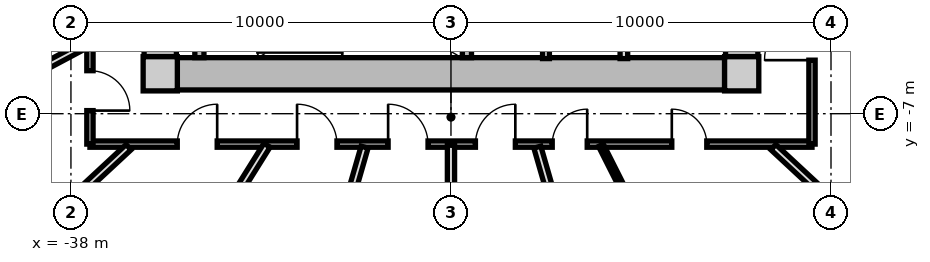
"""IFC4 building model, lengths in metres.
Left out: names, types, materials, properties, quantities, classifications, styles, units other than length and angle.
Written with IfcOpenShell. Run it as: python <this file> out.ifc"""

import sys

from ifc_helpers import new_model, si_unit, direction, frame, frame_2d, origin, origin_2d, place, context, subcontext, project, spatial, rectangle, extrude, source, transform, mapped, element, fill, save


model = new_model("IFC4")
c1 = context("Model", 3, precision=1e-05, world=origin(), true_north=direction((0.0, 1.0)))
c2 = subcontext(c1, "Body", "Model", "MODEL_VIEW")
j1 = project(units=[si_unit("LENGTHUNIT", "METRE"), si_unit("PLANEANGLEUNIT", "RADIAN")], contexts=[c1])
p1 = place(None, origin())
s1 = spatial("IfcSite", under=j1, at=p1, CompositionType="ELEMENT")
p2 = place(p1, origin())
s2 = spatial("IfcBuilding", under=s1, at=p2, CompositionType="ELEMENT")
p3 = place(p2, frame((0.0, 0.0, 39.9)))
s3 = spatial("IfcBuildingStorey", under=s2, at=p3, CompositionType="ELEMENT", Elevation=39.9)
m1 = source(origin(), c2, "Body", "SweptSolid", [
    extrude(rectangle(XDim=0.9, YDim=0.9, at=origin_2d()), origin(), (0.0, 0.0, 1.0), 3.05),
])
for number, where, z_axis, x_axis in (
    (1, (-35.65, -5.95, 0.0), (0.0, 0.0, 1.0), (1.0, 0.0, 0.0)),
    (2, (-20.35, -5.95, 0.0), (0.0, 0.0, 1.0), (1.0, 0.0, 0.0)),
):
    element("IfcColumn", number, at=place(p3, frame(where, z_axis=z_axis, x_axis=x_axis)), inside=s3, PredefinedType="COLUMN", context=c2, shape_type="MappedRepresentation", body=[
        mapped(m1, transform((0.0, 0.0, 0.0), x_axis=(1.0, 0.0, 0.0), y_axis=(0.0, 1.0, 0.0), z_axis=(0.0, 0.0, 1.0), scale=1.0)),
    ])
m2 = source(origin(), c2, "Body", "SweptSolid", [
    extrude(rectangle(XDim=14.4, YDim=0.85, at=frame_2d((7.2, 0.0))), origin(), (0.0, 0.0, 1.0), 2.79),
])
p4 = place(p3, frame((-20.8, -5.95, 0.0), z_axis=(0.0, 0.0, 1.0), x_axis=(-1.0, 0.0, 0.0)))
e3 = element("IfcWall", 3, at=p4, inside=s3, PredefinedType="SHEAR", context=c2, shape_type="MappedRepresentation", body=[
    mapped(m2, transform((0.0, 0.0, 0.0), x_axis=(1.0, 0.0, 0.0), y_axis=(0.0, 1.0, 0.0), z_axis=(0.0, 0.0, 1.0), scale=1.0)),
])
m3 = source(origin(), c2, "Body", "SweptSolid", [
    extrude(rectangle(XDim=11.0, YDim=0.85, at=frame_2d((5.5, 0.0))), origin(), (0.0, 0.0, 1.0), 2.79),
])
p5 = place(p3, frame((-35.65, -5.5, 0.0), z_axis=(0.0, 0.0, 1.0), x_axis=(0.0, 1.0, 0.0)))
e4 = element("IfcWall", 4, at=p5, inside=s3, PredefinedType="SHEAR", context=c2, shape_type="MappedRepresentation", body=[
    mapped(m3, transform((0.0, 0.0, 0.0), x_axis=(1.0, 0.0, 0.0), y_axis=(0.0, 1.0, 0.0), z_axis=(0.0, 0.0, 1.0), scale=1.0)),
])
p6 = place(p5, frame((3.8, 0.0, 0.0)))
e5 = element("IfcOpeningElement", 5, at=p6, cuts=e4, PredefinedType="OPENING", context=c2, shape_type="SweptSolid", body=[
    extrude(rectangle(XDim=1.2, YDim=2.15, at=frame_2d((0.6, 1.075))), frame((0.0, 0.435, 0.0), z_axis=(0.0, -1.0, 0.0), x_axis=(1.0, 0.0, 0.0)), (0.0, 0.0, 1.0), 0.87),
])
p7 = place(p3, frame((-20.35, 5.5, 0.0), z_axis=(0.0, 0.0, 1.0), x_axis=(0.0, -1.0, 0.0)))
e6 = element("IfcWall", 6, at=p7, inside=s3, PredefinedType="SHEAR", context=c2, shape_type="MappedRepresentation", body=[
    mapped(m3, transform((0.0, 0.0, 0.0), x_axis=(1.0, 0.0, 0.0), y_axis=(0.0, 1.0, 0.0), z_axis=(0.0, 0.0, 1.0), scale=1.0)),
])
p8 = place(p7, frame((5.65, 0.0, 0.0)))
e7 = element("IfcOpeningElement", 7, at=p8, cuts=e6, PredefinedType="OPENING", context=c2, shape_type="SweptSolid", body=[
    extrude(rectangle(XDim=1.2, YDim=2.15, at=frame_2d((0.6, 1.075))), frame((0.0, 0.435, 0.0), z_axis=(0.0, -1.0, 0.0), x_axis=(1.0, 0.0, 0.0)), (0.0, 0.0, 1.0), 0.87),
])
p9 = place(p7, frame((9.3, 0.0, 0.0)))
e8 = element("IfcOpeningElement", 8, at=p9, cuts=e6, PredefinedType="OPENING", context=c2, shape_type="SweptSolid", body=[
    extrude(rectangle(XDim=1.0, YDim=2.1, at=frame_2d((0.5, 1.05))), frame((0.0, 0.435, 0.0), z_axis=(0.0, -1.0, 0.0), x_axis=(1.0, 0.0, 0.0)), (0.0, 0.0, 1.0), 0.87),
])
m4 = source(origin(), c2, "Body", "SweptSolid", [
    extrude(rectangle(XDim=3.075, YDim=0.24, at=frame_2d((1.538, 0.0))), origin(), (0.0, 0.0, 1.0), 2.79),
])
for number, where, z_axis, x_axis in (
    (9, (-34.62, -5.525, 0.0), (0.0, 0.0, 1.0), (0.0, 1.0, 0.0)),
    (10, (-27.58, -5.525, 0.0), (0.0, 0.0, 1.0), (0.0, 1.0, 0.0)),
):
    element("IfcWall", number, at=place(p3, frame(where, z_axis=z_axis, x_axis=x_axis)), inside=s3, PredefinedType="PARTITIONING", context=c2, shape_type="MappedRepresentation", body=[
        mapped(m4, transform((0.0, 0.0, 0.0), x_axis=(1.0, 0.0, 0.0), y_axis=(0.0, 1.0, 0.0), z_axis=(0.0, 0.0, 1.0), scale=1.0)),
    ])
m5 = source(origin(), c2, "Body", "SweptSolid", [
    extrude(rectangle(XDim=3.8, YDim=0.2, at=frame_2d((1.9, 0.0))), origin(), (0.0, 0.0, 1.0), 2.775),
])
p10 = place(p3, frame((-23.45, -5.55, 0.0), z_axis=(0.0, 0.0, 1.0), x_axis=(0.0, 1.0, 0.0)))
e11 = element("IfcWall", 11, at=p10, inside=s3, PredefinedType="PARTITIONING", context=c2, shape_type="MappedRepresentation", body=[
    mapped(m5, transform((0.0, 0.0, 0.0), x_axis=(1.0, 0.0, 0.0), y_axis=(0.0, 1.0, 0.0), z_axis=(0.0, 0.0, 1.0), scale=1.0)),
])
m6 = source(origin(), c2, "Body", "SweptSolid", [
    extrude(rectangle(XDim=3.22, YDim=0.18, at=frame_2d((1.61, 0.0))), origin(), (0.0, 0.0, 1.0), 2.775),
])
p11 = place(p3, frame((-25.5, -5.55, 0.0), z_axis=(0.0, 0.0, 1.0), x_axis=(0.0, 1.0, 0.0)))
e12 = element("IfcWall", 12, at=p11, inside=s3, PredefinedType="PARTITIONING", context=c2, shape_type="MappedRepresentation", body=[
    mapped(m6, transform((0.0, 0.0, 0.0), x_axis=(1.0, 0.0, 0.0), y_axis=(0.0, 1.0, 0.0), z_axis=(0.0, 0.0, 1.0), scale=1.0)),
])
m7 = source(origin(), c2, "Body", "SweptSolid", [
    extrude(rectangle(XDim=19.0, YDim=0.165, at=frame_2d((9.5, 0.0))), origin(), (0.0, 0.0, 1.0), 2.775),
])
p12 = place(p3, frame((-18.5, -7.8, 0.0), z_axis=(0.0, 0.0, 1.0), x_axis=(-1.0, 0.0, 0.0)))
e13 = element("IfcWall", 13, at=p12, inside=s3, PredefinedType="PARTITIONING", context=c2, shape_type="MappedRepresentation", body=[
    mapped(m7, transform((0.0, 0.0, 0.0), x_axis=(1.0, 0.0, 0.0), y_axis=(0.0, 1.0, 0.0), z_axis=(0.0, 0.0, 1.0), scale=1.0)),
])
p13 = place(p12, frame((15.652, 0.0, 0.0)))
e14 = element("IfcOpeningElement", 14, at=p13, cuts=e13, PredefinedType="OPENING", context=c2, shape_type="SweptSolid", body=[
    extrude(rectangle(XDim=1.05, YDim=2.15, at=frame_2d((0.525, 1.075))), frame((0.0, 0.093, 0.0), z_axis=(0.0, -1.0, 0.0), x_axis=(1.0, 0.0, 0.0)), (0.0, 0.0, 1.0), 0.185),
])
p14 = place(p12, frame((12.5, 0.0, 0.0)))
e15 = element("IfcOpeningElement", 15, at=p14, cuts=e13, PredefinedType="OPENING", context=c2, shape_type="SweptSolid", body=[
    extrude(rectangle(XDim=1.05, YDim=2.15, at=frame_2d((0.525, 1.075))), frame((0.0, 0.093, 0.0), z_axis=(0.0, -1.0, 0.0), x_axis=(1.0, 0.0, 0.0)), (0.0, 0.0, 1.0), 0.185),
])
p15 = place(p12, frame((10.104, 0.0, 0.0)))
e16 = element("IfcOpeningElement", 16, at=p15, cuts=e13, PredefinedType="OPENING", context=c2, shape_type="SweptSolid", body=[
    extrude(rectangle(XDim=1.05, YDim=2.15, at=frame_2d((0.525, 1.075))), frame((0.0, 0.093, 0.0), z_axis=(0.0, -1.0, 0.0), x_axis=(1.0, 0.0, 0.0)), (0.0, 0.0, 1.0), 0.185),
])
p16 = place(p12, frame((7.806, 0.0, 0.0)))
e17 = element("IfcOpeningElement", 17, at=p16, cuts=e13, PredefinedType="OPENING", context=c2, shape_type="SweptSolid", body=[
    extrude(rectangle(XDim=1.05, YDim=2.15, at=frame_2d((0.525, 1.075))), frame((0.0, 0.093, 0.0), z_axis=(0.0, -1.0, 0.0), x_axis=(1.0, 0.0, 0.0)), (0.0, 0.0, 1.0), 0.185),
])
p17 = place(p12, frame((5.915, 0.0, 0.0)))
e18 = element("IfcOpeningElement", 18, at=p17, cuts=e13, PredefinedType="OPENING", context=c2, shape_type="SweptSolid", body=[
    extrude(rectangle(XDim=0.92, YDim=2.1, at=frame_2d((0.46, 1.05))), frame((0.0, 0.093, 0.0), z_axis=(0.0, -1.0, 0.0), x_axis=(1.0, 0.0, 0.0)), (0.0, 0.0, 1.0), 0.185),
])
p18 = place(p12, frame((2.769, 0.0, 0.0)))
e19 = element("IfcOpeningElement", 19, at=p18, cuts=e13, PredefinedType="OPENING", context=c2, shape_type="SweptSolid", body=[
    extrude(rectangle(XDim=0.92, YDim=2.1, at=frame_2d((0.46, 1.05))), frame((0.0, 0.093, 0.0), z_axis=(0.0, -1.0, 0.0), x_axis=(1.0, 0.0, 0.0)), (0.0, 0.0, 1.0), 0.185),
])
m8 = source(origin(), c2, "Body", "SweptSolid", [
    extrude(rectangle(XDim=15.6, YDim=0.165, at=frame_2d((7.8, 0.0))), origin(), (0.0, 0.0, 1.0), 2.775),
])
p19 = place(p3, frame((-37.5, -7.8, 0.0), z_axis=(0.0, 0.0, 1.0), x_axis=(0.0, 1.0, 0.0)))
e20 = element("IfcWall", 20, at=p19, inside=s3, PredefinedType="PARTITIONING", context=c2, shape_type="MappedRepresentation", body=[
    mapped(m8, transform((0.0, 0.0, 0.0), x_axis=(1.0, 0.0, 0.0), y_axis=(0.0, 1.0, 0.0), z_axis=(0.0, 0.0, 1.0), scale=1.0)),
])
p20 = place(p19, frame((13.293, 0.0, 0.0)))
e21 = element("IfcOpeningElement", 21, at=p20, cuts=e20, PredefinedType="OPENING", context=c2, shape_type="SweptSolid", body=[
    extrude(rectangle(XDim=1.05, YDim=2.15, at=frame_2d((0.525, 1.075))), frame((0.0, 0.093, 0.0), z_axis=(0.0, -1.0, 0.0), x_axis=(1.0, 0.0, 0.0)), (0.0, 0.0, 1.0), 0.185),
])
p21 = place(p19, frame((11.018, 0.0, 0.0)))
e22 = element("IfcOpeningElement", 22, at=p21, cuts=e20, PredefinedType="OPENING", context=c2, shape_type="SweptSolid", body=[
    extrude(rectangle(XDim=1.05, YDim=2.15, at=frame_2d((0.525, 1.075))), frame((0.0, 0.093, 0.0), z_axis=(0.0, -1.0, 0.0), x_axis=(1.0, 0.0, 0.0)), (0.0, 0.0, 1.0), 0.185),
])
p22 = place(p19, frame((7.812, 0.0, 0.0)))
e23 = element("IfcOpeningElement", 23, at=p22, cuts=e20, PredefinedType="OPENING", context=c2, shape_type="SweptSolid", body=[
    extrude(rectangle(XDim=1.05, YDim=2.15, at=frame_2d((0.525, 1.075))), frame((0.0, 0.093, 0.0), z_axis=(0.0, -1.0, 0.0), x_axis=(1.0, 0.0, 0.0)), (0.0, 0.0, 1.0), 0.185),
])
p23 = place(p19, frame((6.035, 0.0, 0.0)))
e24 = element("IfcOpeningElement", 24, at=p23, cuts=e20, PredefinedType="OPENING", context=c2, shape_type="SweptSolid", body=[
    extrude(rectangle(XDim=1.05, YDim=2.15, at=frame_2d((0.525, 1.075))), frame((0.0, 0.093, 0.0), z_axis=(0.0, -1.0, 0.0), x_axis=(1.0, 0.0, 0.0)), (0.0, 0.0, 1.0), 0.185),
])
p24 = place(p19, frame((3.489, 0.0, 0.0)))
e25 = element("IfcOpeningElement", 25, at=p24, cuts=e20, PredefinedType="OPENING", context=c2, shape_type="SweptSolid", body=[
    extrude(rectangle(XDim=1.05, YDim=2.15, at=frame_2d((0.525, 1.075))), frame((0.0, 0.093, 0.0), z_axis=(0.0, -1.0, 0.0), x_axis=(1.0, 0.0, 0.0)), (0.0, 0.0, 1.0), 0.185),
])
p25 = place(p19, frame((0.882, 0.0, 0.0)))
e26 = element("IfcOpeningElement", 26, at=p25, cuts=e20, PredefinedType="OPENING", context=c2, shape_type="SweptSolid", body=[
    extrude(rectangle(XDim=1.05, YDim=2.15, at=frame_2d((0.525, 1.075))), frame((0.0, 0.093, 0.0), z_axis=(0.0, -1.0, 0.0), x_axis=(1.0, 0.0, 0.0)), (0.0, 0.0, 1.0), 0.185),
])
p26 = place(p3, frame((-18.5, 7.8, 0.0), z_axis=(0.0, 0.0, 1.0), x_axis=(0.0, -1.0, 0.0)))
e27 = element("IfcWall", 27, at=p26, inside=s3, PredefinedType="PARTITIONING", context=c2, shape_type="MappedRepresentation", body=[
    mapped(m8, transform((0.0, 0.0, 0.0), x_axis=(1.0, 0.0, 0.0), y_axis=(0.0, 1.0, 0.0), z_axis=(0.0, 0.0, 1.0), scale=1.0)),
])
p27 = place(p26, frame((12.141, 0.0, 0.0)))
e28 = element("IfcOpeningElement", 28, at=p27, cuts=e27, PredefinedType="OPENING", context=c2, shape_type="SweptSolid", body=[
    extrude(rectangle(XDim=1.25, YDim=2.2, at=frame_2d((0.625, 1.1))), frame((0.0, 0.093, 0.0), z_axis=(0.0, -1.0, 0.0), x_axis=(1.0, 0.0, 0.0)), (0.0, 0.0, 1.0), 0.185),
])
p28 = place(p26, frame((7.175, 0.0, 0.0)))
e29 = element("IfcOpeningElement", 29, at=p28, cuts=e27, PredefinedType="OPENING", context=c2, shape_type="SweptSolid", body=[
    extrude(rectangle(XDim=1.25, YDim=2.2, at=frame_2d((0.625, 1.1))), frame((0.0, 0.093, 0.0), z_axis=(0.0, -1.0, 0.0), x_axis=(1.0, 0.0, 0.0)), (0.0, 0.0, 1.0), 0.185),
])
p29 = place(p26, frame((2.826, 0.0, 0.0)))
e30 = element("IfcOpeningElement", 30, at=p29, cuts=e27, PredefinedType="OPENING", context=c2, shape_type="SweptSolid", body=[
    extrude(rectangle(XDim=1.05, YDim=2.15, at=frame_2d((0.525, 1.075))), frame((0.0, 0.093, 0.0), z_axis=(0.0, -1.0, 0.0), x_axis=(1.0, 0.0, 0.0)), (0.0, 0.0, 1.0), 0.185),
])
p30 = place(p26, frame((0.881, 0.0, 0.0)))
e31 = element("IfcOpeningElement", 31, at=p30, cuts=e27, PredefinedType="OPENING", context=c2, shape_type="SweptSolid", body=[
    extrude(rectangle(XDim=1.05, YDim=2.15, at=frame_2d((0.525, 1.075))), frame((0.0, 0.093, 0.0), z_axis=(0.0, -1.0, 0.0), x_axis=(1.0, 0.0, 0.0)), (0.0, 0.0, 1.0), 0.185),
])
m9 = source(origin(), c2, "Body", "SweptSolid", [
    extrude(rectangle(XDim=7.435, YDim=0.19, at=frame_2d((3.717, 0.0))), origin(), (0.0, 0.0, 1.0), 2.225),
])
p31 = place(p3, frame((-36.483, -7.88, 0.0), z_axis=(0.0, 0.0, 1.0), x_axis=(-0.732651956848, -0.680603489652, 0.0)))
e32 = element("IfcWall", 32, at=p31, inside=s3, PredefinedType="PARTITIONING", context=c2, shape_type="MappedRepresentation", body=[
    mapped(m9, transform((0.0, 0.0, 0.0), x_axis=(1.0, 0.0, 0.0), y_axis=(0.0, 1.0, 0.0), z_axis=(0.0, 0.0, 1.0), scale=1.0)),
])
m10 = source(origin(), c2, "Body", "SweptSolid", [
    extrude(rectangle(XDim=7.873, YDim=0.19, at=frame_2d((3.937, 0.0))), origin(), (0.0, 0.0, 1.0), 2.775),
])
p32 = place(p3, frame((-37.53, -5.138, 0.0), z_axis=(0.0, 0.0, 1.0), x_axis=(-0.882666052726, -0.470000680175, 0.0)))
e33 = element("IfcWall", 33, at=p32, inside=s3, PredefinedType="PARTITIONING", context=c2, shape_type="MappedRepresentation", body=[
    mapped(m10, transform((0.0, 0.0, 0.0), x_axis=(1.0, 0.0, 0.0), y_axis=(0.0, 1.0, 0.0), z_axis=(0.0, 0.0, 1.0), scale=1.0)),
])
m11 = source(origin(), c2, "Body", "SweptSolid", [
    extrude(rectangle(XDim=10.196, YDim=0.19, at=frame_2d((5.098, 0.0))), origin(), (0.0, 0.0, 1.0), 2.225),
])
p33 = place(p3, frame((-30.273, -7.88, 0.0), z_axis=(0.0, 0.0, 1.0), x_axis=(-0.277136420347, -0.960830580549, 0.0)))
e34 = element("IfcWall", 34, at=p33, inside=s3, PredefinedType="PARTITIONING", context=c2, shape_type="MappedRepresentation", body=[
    mapped(m11, transform((0.0, 0.0, 0.0), x_axis=(1.0, 0.0, 0.0), y_axis=(0.0, 1.0, 0.0), z_axis=(0.0, 0.0, 1.0), scale=1.0)),
])
m12 = source(origin(), c2, "Body", "SweptSolid", [
    extrude(rectangle(XDim=8.818, YDim=0.19, at=frame_2d((4.409, 0.0))), origin(), (0.0, 0.0, 1.0), 2.775),
])
p34 = place(p3, frame((-32.841, -7.83, 0.0), z_axis=(0.0, 0.0, 1.0), x_axis=(-0.529931746109, -0.848040296487, 0.0)))
e35 = element("IfcWall", 35, at=p34, inside=s3, PredefinedType="PARTITIONING", context=c2, shape_type="MappedRepresentation", body=[
    mapped(m12, transform((0.0, 0.0, 0.0), x_axis=(1.0, 0.0, 0.0), y_axis=(0.0, 1.0, 0.0), z_axis=(0.0, 0.0, 1.0), scale=1.0)),
])
p35 = place(p3, frame((-25.727, -7.88, 0.0), z_axis=(0.0, 0.0, 1.0), x_axis=(0.277136420347, -0.960830580549, 0.0)))
e36 = element("IfcWall", 36, at=p35, inside=s3, PredefinedType="PARTITIONING", context=c2, shape_type="MappedRepresentation", body=[
    mapped(m11, transform((0.0, 0.0, 0.0), x_axis=(1.0, 0.0, 0.0), y_axis=(0.0, 1.0, 0.0), z_axis=(0.0, 0.0, 1.0), scale=1.0)),
])
m13 = source(origin(), c2, "Body", "SweptSolid", [
    extrude(rectangle(XDim=9.846, YDim=0.19, at=frame_2d((4.923, 0.0))), origin(), (0.0, 0.0, 1.0), 2.775),
])
p36 = place(p3, frame((-28.0, -7.83, 0.0), z_axis=(0.0, 0.0, 1.0), x_axis=(0.0, -1.0, 0.0)))
e37 = element("IfcWall", 37, at=p36, inside=s3, PredefinedType="PARTITIONING", context=c2, shape_type="MappedRepresentation", body=[
    mapped(m13, transform((0.0, 0.0, 0.0), x_axis=(1.0, 0.0, 0.0), y_axis=(0.0, 1.0, 0.0), z_axis=(0.0, 0.0, 1.0), scale=1.0)),
])
p37 = place(p3, frame((-19.517, -7.88, 0.0), z_axis=(0.0, 0.0, 1.0), x_axis=(0.732651956848, -0.680603489652, 0.0)))
e38 = element("IfcWall", 38, at=p37, inside=s3, PredefinedType="PARTITIONING", context=c2, shape_type="MappedRepresentation", body=[
    mapped(m9, transform((0.0, 0.0, 0.0), x_axis=(1.0, 0.0, 0.0), y_axis=(0.0, 1.0, 0.0), z_axis=(0.0, 0.0, 1.0), scale=1.0)),
])
m14 = source(origin(), c2, "Body", "SweptSolid", [
    extrude(rectangle(XDim=9.225, YDim=0.14, at=frame_2d((4.613, 0.0))), origin(), (0.0, 0.0, 1.0), 2.775),
])
p38 = place(p3, frame((-24.054, -7.83, 0.0), z_axis=(0.0, 0.0, 1.0), x_axis=(0.450460543767, -0.892796336523, 0.0)))
e39 = element("IfcWall", 39, at=p38, inside=s3, PredefinedType="PARTITIONING", context=c2, shape_type="MappedRepresentation", body=[
    mapped(m14, transform((0.0, 0.0, 0.0), x_axis=(1.0, 0.0, 0.0), y_axis=(0.0, 1.0, 0.0), z_axis=(0.0, 0.0, 1.0), scale=1.0)),
])
m15 = source(origin(), c2, "Body", "SweptSolid", [
    extrude(rectangle(XDim=1.05, YDim=2.15, at=frame_2d((0.525, 1.075))), frame((0.0, 0.025, 0.0), z_axis=(0.0, -1.0, 0.0), x_axis=(1.0, 0.0, 0.0)), (0.0, 0.0, 1.0), 0.05),
])
p39 = place(p25, frame((1.05, 0.0, 0.0), z_axis=(0.0, 0.0, 1.0), x_axis=(-1.0, 0.0, 0.0)))
e40 = element("IfcDoor", 40, at=p39, inside=s3, OperationType="SINGLE_SWING_RIGHT", PredefinedType="DOOR", context=c2, shape_type="MappedRepresentation", body=[
    mapped(m15, transform((0.0, 0.0, 0.0), x_axis=(1.0, 0.0, 0.0), y_axis=(0.0, 1.0, 0.0), z_axis=(0.0, 0.0, 1.0), scale=1.0)),
])
fill(e26, e40)
p40 = place(p13, frame((1.05, 0.0, 0.0), z_axis=(0.0, 0.0, 1.0), x_axis=(-1.0, 0.0, 0.0)))
e41 = element("IfcDoor", 41, at=p40, inside=s3, OperationType="SINGLE_SWING_RIGHT", PredefinedType="DOOR", context=c2, shape_type="MappedRepresentation", body=[
    mapped(m15, transform((0.0, 0.0, 0.0), x_axis=(1.0, 0.0, 0.0), y_axis=(0.0, 1.0, 0.0), z_axis=(0.0, 0.0, 1.0), scale=1.0)),
])
fill(e14, e41)
p41 = place(p14, frame((1.05, 0.0, 0.0), z_axis=(0.0, 0.0, 1.0), x_axis=(-1.0, 0.0, 0.0)))
e42 = element("IfcDoor", 42, at=p41, inside=s3, OperationType="SINGLE_SWING_LEFT", PredefinedType="DOOR", context=c2, shape_type="MappedRepresentation", body=[
    mapped(m15, transform((0.0, 0.0, 0.0), x_axis=(1.0, 0.0, 0.0), y_axis=(0.0, 1.0, 0.0), z_axis=(0.0, 0.0, 1.0), scale=1.0)),
])
fill(e15, e42)
p42 = place(p15, frame((1.05, 0.0, 0.0), z_axis=(0.0, 0.0, 1.0), x_axis=(-1.0, 0.0, 0.0)))
e43 = element("IfcDoor", 43, at=p42, inside=s3, OperationType="SINGLE_SWING_LEFT", PredefinedType="DOOR", context=c2, shape_type="MappedRepresentation", body=[
    mapped(m15, transform((0.0, 0.0, 0.0), x_axis=(1.0, 0.0, 0.0), y_axis=(0.0, 1.0, 0.0), z_axis=(0.0, 0.0, 1.0), scale=1.0)),
])
fill(e16, e43)
p43 = place(p16, frame((1.05, 0.0, 0.0), z_axis=(0.0, 0.0, 1.0), x_axis=(-1.0, 0.0, 0.0)))
e44 = element("IfcDoor", 44, at=p43, inside=s3, OperationType="SINGLE_SWING_RIGHT", PredefinedType="DOOR", context=c2, shape_type="MappedRepresentation", body=[
    mapped(m15, transform((0.0, 0.0, 0.0), x_axis=(1.0, 0.0, 0.0), y_axis=(0.0, 1.0, 0.0), z_axis=(0.0, 0.0, 1.0), scale=1.0)),
])
fill(e17, e44)
m16 = source(origin(), c2, "Body", "SweptSolid", [
    extrude(rectangle(XDim=0.92, YDim=2.1, at=frame_2d((0.46, 1.05))), frame((0.0, 0.025, 0.0), z_axis=(0.0, -1.0, 0.0), x_axis=(1.0, 0.0, 0.0)), (0.0, 0.0, 1.0), 0.05),
])
p44 = place(p17, frame((0.92, 0.0, 0.0), z_axis=(0.0, 0.0, 1.0), x_axis=(-1.0, 0.0, 0.0)))
e45 = element("IfcDoor", 45, at=p44, inside=s3, OperationType="SINGLE_SWING_RIGHT", PredefinedType="DOOR", context=c2, shape_type="MappedRepresentation", body=[
    mapped(m16, transform((0.0, 0.0, 0.0), x_axis=(1.0, 0.0, 0.0), y_axis=(0.0, 1.0, 0.0), z_axis=(0.0, 0.0, 1.0), scale=1.0)),
])
fill(e18, e45)
p45 = place(p18, frame((0.92, 0.0, 0.0), z_axis=(0.0, 0.0, 1.0), x_axis=(-1.0, 0.0, 0.0)))
e46 = element("IfcDoor", 46, at=p45, inside=s3, OperationType="SINGLE_SWING_LEFT", PredefinedType="DOOR", context=c2, shape_type="MappedRepresentation", body=[
    mapped(m16, transform((0.0, 0.0, 0.0), x_axis=(1.0, 0.0, 0.0), y_axis=(0.0, 1.0, 0.0), z_axis=(0.0, 0.0, 1.0), scale=1.0)),
])
fill(e19, e46)
m17 = source(origin(), c2, "Body", "SweptSolid", [
    extrude(rectangle(XDim=1.25, YDim=2.2, at=frame_2d((0.625, 1.1))), frame((0.0, 0.025, 0.0), z_axis=(0.0, -1.0, 0.0), x_axis=(1.0, 0.0, 0.0)), (0.0, 0.0, 1.0), 0.05),
])
p46 = place(p27, frame((1.25, 0.0, 0.0), z_axis=(0.0, 0.0, 1.0), x_axis=(-1.0, 0.0, 0.0)))
e47 = element("IfcDoor", 47, at=p46, inside=s3, OperationType="SINGLE_SWING_LEFT", PredefinedType="DOOR", context=c2, shape_type="MappedRepresentation", body=[
    mapped(m17, transform((0.0, 0.0, 0.0), x_axis=(1.0, 0.0, 0.0), y_axis=(0.0, 1.0, 0.0), z_axis=(0.0, 0.0, 1.0), scale=1.0)),
])
fill(e28, e47)
save(model, sys.argv[1])
